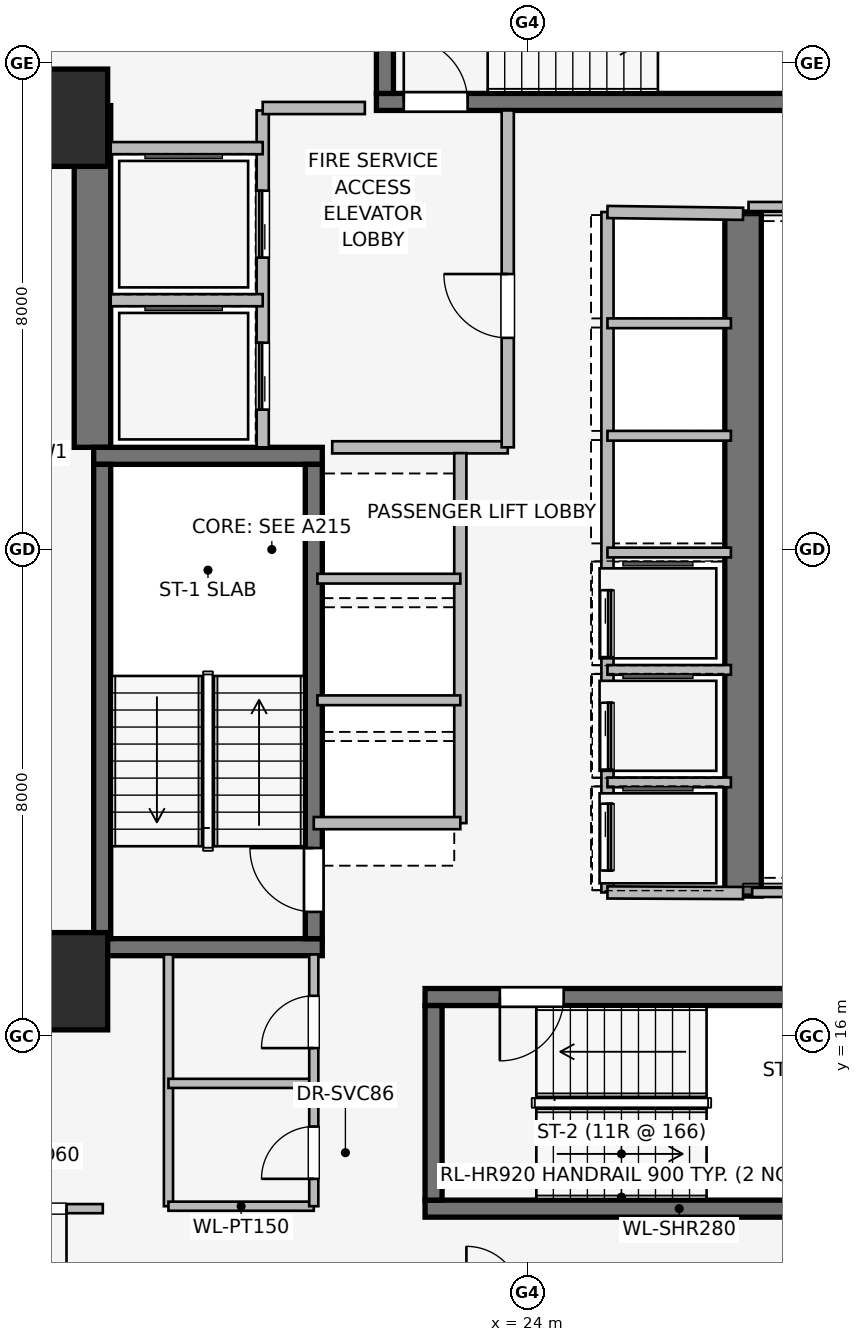
"""IFC4 building model, lengths in metres.
Left out: names, types, materials, properties, quantities, classifications, styles, units other than length and angle.
Written with IfcOpenShell. Run it as: python <this file> out.ifc"""

import sys

from ifc_helpers import new_model, si_unit, direction, frame, frame_2d, origin, origin_2d, place, context, subcontext, project, spatial, rectangle, extrude, element, fill, save


model = new_model("IFC4")
c1 = context("Model", 3, precision=1e-05, world=origin(), true_north=direction((0.0, 1.0)))
c2 = subcontext(c1, "Body", "Model", "MODEL_VIEW")
j1 = project(units=[si_unit("LENGTHUNIT", "METRE"), si_unit("PLANEANGLEUNIT", "RADIAN")], contexts=[c1])
p1 = place(None, origin())
s1 = spatial("IfcSite", under=j1, at=p1, CompositionType="ELEMENT")
p2 = place(p1, origin())
s2 = spatial("IfcBuilding", under=s1, at=p2, CompositionType="ELEMENT")
p3 = place(p2, frame((0.0, 0.0, 52.55)))
s3 = spatial("IfcBuildingStorey", under=s2, at=p3, CompositionType="ELEMENT", Elevation=52.55)
p4 = place(p3, frame((16.85, 25.68, 0.0), z_axis=(0.0, 0.0, 1.0), x_axis=(0.0, 1.0, 0.0)))
e1 = element("IfcWall", 1, at=p4, inside=s3, PredefinedType="SHEAR", context=c2, shape_type="SweptSolid", body=[
    extrude(rectangle(XDim=5.62, YDim=0.6, at=frame_2d((2.81, 0.0))), origin(), (0.0, 0.0, 1.0), 3.65),
])
p5 = place(p3, frame((27.55, 29.55, 0.0), z_axis=(0.0, 0.0, 1.0), x_axis=(0.0, -1.0, 0.0)))
e2 = element("IfcWall", 2, at=p5, inside=s3, PredefinedType="SHEAR", context=c2, shape_type="SweptSolid", body=[
    extrude(rectangle(XDim=11.25, YDim=0.6, at=frame_2d((5.625, 0.0))), origin(), (0.0, 0.0, 1.0), 3.65),
])
for number, where, z_axis, x_axis in (
    (3, (16.87, 17.46, 0.0), (0.0, 0.0, 1.0), (1.0, 0.0, 0.0)),
    (4, (20.63, 25.54, 0.0), (0.0, 0.0, 1.0), (-1.0, 0.0, 0.0)),
):
    element("IfcWall", number, at=place(p3, frame(where, z_axis=z_axis, x_axis=x_axis)), inside=s3, PredefinedType="SHEAR", context=c2, shape_type="SweptSolid", body=[
        extrude(rectangle(XDim=3.76, YDim=0.28, at=frame_2d((1.88, 0.0))), origin(), (0.0, 0.0, 1.0), 3.65),
    ])
p6 = place(p3, frame((17.01, 25.4, 0.0), z_axis=(0.0, 0.0, 1.0), x_axis=(0.0, -1.0, 0.0)))
e5 = element("IfcWall", 5, at=p6, inside=s3, PredefinedType="SHEAR", context=c2, shape_type="SweptSolid", body=[
    extrude(rectangle(XDim=7.8, YDim=0.28, at=frame_2d((3.9, 0.0))), origin(), (0.0, 0.0, 1.0), 3.65),
])
p7 = place(p3, frame((20.49, 17.6, 0.0), z_axis=(0.0, 0.0, 1.0), x_axis=(0.0, 1.0, 0.0)))
e6 = element("IfcWall", 6, at=p7, inside=s3, PredefinedType="SHEAR", context=c2, shape_type="SweptSolid", body=[
    extrude(rectangle(XDim=7.8, YDim=0.28, at=frame_2d((3.9, 0.0))), origin(), (0.0, 0.0, 1.0), 3.65),
])
p8 = place(p7, frame((0.44, 0.0, 0.0)))
e7 = element("IfcOpeningElement", 7, at=p8, cuts=e6, PredefinedType="OPENING", context=c2, shape_type="SweptSolid", body=[
    extrude(rectangle(XDim=1.05, YDim=2.0, at=frame_2d((0.525, 1.0))), frame((0.0, 0.15, 0.0), z_axis=(0.0, -1.0, 0.0), x_axis=(1.0, 0.0, 0.0)), (0.0, 0.0, 1.0), 0.3),
])
p9 = place(p3, frame((22.32, 13.16, 0.0), z_axis=(0.0, 0.0, 1.0), x_axis=(1.0, 0.0, 0.0)))
e8 = element("IfcWall", 8, at=p9, inside=s3, PredefinedType="SHEAR", context=c2, shape_type="SweptSolid", body=[
    extrude(rectangle(XDim=8.36, YDim=0.28, at=frame_2d((4.18, 0.0))), origin(), (0.0, 0.0, 1.0), 3.65),
])
p10 = place(p3, frame((30.68, 16.64, 0.0), z_axis=(0.0, 0.0, 1.0), x_axis=(-1.0, 0.0, 0.0)))
e9 = element("IfcWall", 9, at=p10, inside=s3, PredefinedType="SHEAR", context=c2, shape_type="SweptSolid", body=[
    extrude(rectangle(XDim=8.36, YDim=0.28, at=frame_2d((4.18, 0.0))), origin(), (0.0, 0.0, 1.0), 3.65),
])
p11 = place(p10, frame((6.08, 0.0, 0.0)))
e10 = element("IfcOpeningElement", 10, at=p11, cuts=e9, PredefinedType="OPENING", context=c2, shape_type="SweptSolid", body=[
    extrude(rectangle(XDim=1.05, YDim=2.0, at=frame_2d((0.525, 1.0))), frame((0.0, 0.15, 0.0), z_axis=(0.0, -1.0, 0.0), x_axis=(1.0, 0.0, 0.0)), (0.0, 0.0, 1.0), 0.3),
])
p12 = place(p3, frame((22.46, 16.5, 0.0), z_axis=(0.0, 0.0, 1.0), x_axis=(0.0, -1.0, 0.0)))
e11 = element("IfcWall", 11, at=p12, inside=s3, PredefinedType="SHEAR", context=c2, shape_type="SweptSolid", body=[
    extrude(rectangle(XDim=3.2, YDim=0.28, at=frame_2d((1.6, 0.0))), origin(), (0.0, 0.0, 1.0), 3.65),
])
p13 = place(p3, frame((21.52, 31.36, 0.0), z_axis=(0.0, 0.0, 1.0), x_axis=(1.0, 0.0, 0.0)))
e12 = element("IfcWall", 12, at=p13, inside=s3, PredefinedType="SHEAR", context=c2, shape_type="SweptSolid", body=[
    extrude(rectangle(XDim=8.36, YDim=0.28, at=frame_2d((4.18, 0.0))), origin(), (0.0, 0.0, 1.0), 3.65),
])
p14 = place(p13, frame((0.45, 0.0, 0.0)))
e13 = element("IfcOpeningElement", 13, at=p14, cuts=e12, PredefinedType="OPENING", context=c2, shape_type="SweptSolid", body=[
    extrude(rectangle(XDim=1.05, YDim=2.0, at=frame_2d((0.525, 1.0))), frame((0.0, 0.15, 0.0), z_axis=(0.0, -1.0, 0.0), x_axis=(1.0, 0.0, 0.0)), (0.0, 0.0, 1.0), 0.3),
])
p15 = place(p3, frame((21.66, 34.7, 0.0), z_axis=(0.0, 0.0, 1.0), x_axis=(0.0, -1.0, 0.0)))
e14 = element("IfcWall", 14, at=p15, inside=s3, PredefinedType="SHEAR", context=c2, shape_type="SweptSolid", body=[
    extrude(rectangle(XDim=3.2, YDim=0.28, at=frame_2d((1.6, 0.0))), origin(), (0.0, 0.0, 1.0), 3.65),
])
for number, where, z_axis, x_axis in (
    (15, (16.3, 16.9, 0.0), (0.0, 0.0, 1.0), (1.0, 0.0, 0.0)),
    (16, (16.3, 31.1, 0.0), (0.0, 0.0, 1.0), (1.0, 0.0, 0.0)),
):
    element("IfcColumn", number, at=place(p3, frame(where, z_axis=z_axis, x_axis=x_axis)), inside=s3, PredefinedType="COLUMN", context=c2, shape_type="SweptSolid", body=[
        extrude(rectangle(XDim=1.6, YDim=1.6, at=origin_2d()), origin(), (0.0, 0.0, 1.0), 3.65),
    ])
p16 = place(p3, frame((19.65, 25.68, 0.0), z_axis=(0.0, 0.0, 1.0), x_axis=(0.0, 1.0, 0.0)))
e17 = element("IfcWall", 17, at=p16, inside=s3, PredefinedType="PARTITIONING", context=c2, shape_type="SweptSolid", body=[
    extrude(rectangle(XDim=5.54, YDim=0.2, at=frame_2d((2.77, 0.0))), origin(), (0.0, 0.0, 1.0), 3.36),
])
p17 = place(p16, frame((0.62, 0.0, 0.0)))
e18 = element("IfcOpeningElement", 18, at=p17, cuts=e17, PredefinedType="OPENING", context=c2, shape_type="SweptSolid", body=[
    extrude(rectangle(XDim=1.1, YDim=2.2, at=frame_2d((0.55, 1.1))), frame((0.0, 0.11, 0.0), z_axis=(0.0, -1.0, 0.0), x_axis=(1.0, 0.0, 0.0)), (0.0, 0.0, 1.0), 0.22),
])
p18 = place(p16, frame((3.12, 0.0, 0.0)))
e19 = element("IfcOpeningElement", 19, at=p18, cuts=e17, PredefinedType="OPENING", context=c2, shape_type="SweptSolid", body=[
    extrude(rectangle(XDim=1.1, YDim=2.2, at=frame_2d((0.55, 1.1))), frame((0.0, 0.11, 0.0), z_axis=(0.0, -1.0, 0.0), x_axis=(1.0, 0.0, 0.0)), (0.0, 0.0, 1.0), 0.22),
])
p19 = place(p3, frame((20.793, 25.68, 0.0), z_axis=(0.0, 0.0, 1.0), x_axis=(1.0, 0.0, 0.0)))
e20 = element("IfcWall", 20, at=p19, inside=s3, PredefinedType="PARTITIONING", context=c2, shape_type="SweptSolid", body=[
    extrude(rectangle(XDim=2.887, YDim=0.2, at=frame_2d((1.443, 0.0))), origin(), (0.0, 0.0, 1.0), 3.36),
])
p20 = place(p3, frame((23.68, 25.68, 0.0), z_axis=(0.0, 0.0, 1.0), x_axis=(0.0, 1.0, 0.0)))
e21 = element("IfcWall", 21, at=p20, inside=s3, PredefinedType="PARTITIONING", context=c2, shape_type="SweptSolid", body=[
    extrude(rectangle(XDim=5.54, YDim=0.2, at=frame_2d((2.77, 0.0))), origin(), (0.0, 0.0, 1.0), 3.36),
])
p21 = place(p20, frame((1.8, 0.0, 0.0)))
e22 = element("IfcOpeningElement", 22, at=p21, cuts=e21, PredefinedType="OPENING", context=c2, shape_type="SweptSolid", body=[
    extrude(rectangle(XDim=1.05, YDim=2.0, at=frame_2d((0.525, 1.0))), frame((0.0, 0.11, 0.0), z_axis=(0.0, -1.0, 0.0), x_axis=(1.0, 0.0, 0.0)), (0.0, 0.0, 1.0), 0.22),
])
p22 = place(p3, frame((21.33, 31.26, 0.0), z_axis=(0.0, 0.0, 1.0), x_axis=(-1.0, 0.0, 0.0)))
e23 = element("IfcWall", 23, at=p22, inside=s3, PredefinedType="PARTITIONING", context=c2, shape_type="SweptSolid", body=[
    extrude(rectangle(XDim=1.68, YDim=0.2, at=frame_2d((0.84, 0.0))), origin(), (0.0, 0.0, 1.0), 3.36),
])
p23 = place(p3, frame((17.15, 28.1, 0.0), z_axis=(0.0, 0.0, 1.0), x_axis=(1.0, 0.0, 0.0)))
e24 = element("IfcWall", 24, at=p23, inside=s3, PredefinedType="PARTITIONING", context=c2, shape_type="SweptSolid", body=[
    extrude(rectangle(XDim=2.5, YDim=0.2, at=frame_2d((1.25, 0.0))), origin(), (0.0, 0.0, 1.0), 3.36),
])
p24 = place(p3, frame((19.65, 30.6, 0.0), z_axis=(0.0, 0.0, 1.0), x_axis=(-1.0, 0.0, 0.0)))
e25 = element("IfcWall", 25, at=p24, inside=s3, PredefinedType="PARTITIONING", context=c2, shape_type="SweptSolid", body=[
    extrude(rectangle(XDim=2.5, YDim=0.2, at=frame_2d((1.25, 0.0))), origin(), (0.0, 0.0, 1.0), 2.26),
])
p25 = place(p3, frame((22.9, 19.5, 0.0), z_axis=(0.0, 0.0, 1.0), x_axis=(0.0, 1.0, 0.0)))
e26 = element("IfcWall", 26, at=p25, inside=s3, PredefinedType="PARTITIONING", context=c2, shape_type="SweptSolid", body=[
    extrude(rectangle(XDim=6.085, YDim=0.2, at=frame_2d((3.042, 0.0))), origin(), (0.0, 0.0, 1.0), 3.36),
])
p26 = place(p3, frame((20.49, 19.5, 0.0), z_axis=(0.0, 0.0, 1.0), x_axis=(1.0, 0.0, 0.0)))
e27 = element("IfcWall", 27, at=p26, inside=s3, PredefinedType="PARTITIONING", context=c2, shape_type="SweptSolid", body=[
    extrude(rectangle(XDim=2.41, YDim=0.2, at=frame_2d((1.205, 0.0))), origin(), (0.0, 0.0, 1.0), 2.26),
])
for number, where, z_axis, x_axis in (
    (28, (20.55, 21.52, 0.0), (0.0, 0.0, 1.0), (1.0, 0.0, 0.0)),
    (29, (20.55, 23.52, 0.0), (0.0, 0.0, 1.0), (1.0, 0.0, 0.0)),
):
    element("IfcWall", number, at=place(p3, frame(where, z_axis=z_axis, x_axis=x_axis)), inside=s3, PredefinedType="PARTITIONING", context=c2, shape_type="SweptSolid", body=[
        extrude(rectangle(XDim=2.35, YDim=0.16, at=frame_2d((1.175, 0.0))), origin(), (0.0, 0.0, 1.0), 3.36),
    ])
p27 = place(p3, frame((25.32, 29.55, 0.0), z_axis=(0.0, 0.0, 1.0), x_axis=(0.0, -1.0, 0.0)))
e30 = element("IfcWall", 30, at=p27, inside=s3, PredefinedType="PARTITIONING", context=c2, shape_type="SweptSolid", body=[
    extrude(rectangle(XDim=11.19, YDim=0.2, at=frame_2d((5.595, 0.0))), origin(), (0.0, 0.0, 1.0), 3.36),
])
p28 = place(p27, frame((6.22, 0.0, 0.0)))
e31 = element("IfcOpeningElement", 31, at=p28, cuts=e30, PredefinedType="OPENING", context=c2, shape_type="SweptSolid", body=[
    extrude(rectangle(XDim=1.1, YDim=2.2, at=frame_2d((0.55, 1.1))), frame((0.0, 0.11, 0.0), z_axis=(0.0, -1.0, 0.0), x_axis=(1.0, 0.0, 0.0)), (0.0, 0.0, 1.0), 0.22),
])
p29 = place(p27, frame((8.07, 0.0, 0.0)))
e32 = element("IfcOpeningElement", 32, at=p29, cuts=e30, PredefinedType="OPENING", context=c2, shape_type="SweptSolid", body=[
    extrude(rectangle(XDim=1.1, YDim=2.2, at=frame_2d((0.55, 1.1))), frame((0.0, 0.11, 0.0), z_axis=(0.0, -1.0, 0.0), x_axis=(1.0, 0.0, 0.0)), (0.0, 0.0, 1.0), 0.22),
])
p30 = place(p27, frame((9.73, 0.0, 0.0)))
e33 = element("IfcOpeningElement", 33, at=p30, cuts=e30, PredefinedType="OPENING", context=c2, shape_type="SweptSolid", body=[
    extrude(rectangle(XDim=1.1, YDim=2.2, at=frame_2d((0.55, 1.1))), frame((0.0, 0.11, 0.0), z_axis=(0.0, -1.0, 0.0), x_axis=(1.0, 0.0, 0.0)), (0.0, 0.0, 1.0), 0.22),
])
p31 = place(p3, frame((25.32, 18.36, 0.0), z_axis=(0.0, 0.0, 1.0), x_axis=(0.999989925833, -0.004488678231, 0.0)))
e34 = element("IfcWall", 34, at=p31, inside=s3, PredefinedType="PARTITIONING", context=c2, shape_type="SweptSolid", body=[
    extrude(rectangle(XDim=2.23, YDim=0.2, at=frame_2d((1.115, 0.0))), origin(), (0.0, 0.0, 1.0), 3.36),
])
p32 = place(p3, frame((27.55, 29.52, 0.0), z_axis=(0.0, 0.0, 1.0), x_axis=(-0.999909343457, 0.013464949556, 0.0)))
e35 = element("IfcWall", 35, at=p32, inside=s3, PredefinedType="PARTITIONING", context=c2, shape_type="SweptSolid", body=[
    extrude(rectangle(XDim=2.23, YDim=0.2, at=frame_2d((1.115, 0.0))), origin(), (0.0, 0.0, 1.0), 2.26),
])
for number, where, z_axis, x_axis in (
    (36, (25.32, 20.17, 0.0), (0.0, 0.0, 1.0), (1.0, 0.0, 0.0)),
    (37, (25.32, 22.02, 0.0), (0.0, 0.0, 1.0), (1.0, 0.0, 0.0)),
    (38, (25.32, 23.95, 0.0), (0.0, 0.0, 1.0), (1.0, 0.0, 0.0)),
    (39, (25.32, 25.87, 0.0), (0.0, 0.0, 1.0), (1.0, 0.0, 0.0)),
    (40, (25.32, 27.72, 0.0), (0.0, 0.0, 1.0), (1.0, 0.0, 0.0)),
):
    element("IfcWall", number, at=place(p3, frame(where, z_axis=z_axis, x_axis=x_axis)), inside=s3, PredefinedType="PARTITIONING", context=c2, shape_type="SweptSolid", body=[
        extrude(rectangle(XDim=2.03, YDim=0.16, at=frame_2d((1.015, 0.0))), origin(), (0.0, 0.0, 1.0), 3.36),
    ])
p33 = place(p3, frame((18.1, 17.34, 0.0), z_axis=(0.0, 0.0, 1.0), x_axis=(0.0, -1.0, 0.0)))
e41 = element("IfcWall", 41, at=p33, inside=s3, PredefinedType="PARTITIONING", context=c2, shape_type="SweptSolid", body=[
    extrude(rectangle(XDim=4.14, YDim=0.15, at=frame_2d((2.07, 0.0))), origin(), (0.0, 0.0, 1.0), 3.36),
])
for number, where, z_axis, x_axis in (
    (42, (18.1, 13.2, 0.0), (0.0, 0.0, 1.0), (1.0, 0.0, 0.0)),
    (43, (18.1, 15.22, 0.0), (0.0, 0.0, 1.0), (1.0, 0.0, 0.0)),
):
    element("IfcWall", number, at=place(p3, frame(where, z_axis=z_axis, x_axis=x_axis)), inside=s3, PredefinedType="PARTITIONING", context=c2, shape_type="SweptSolid", body=[
        extrude(rectangle(XDim=2.39, YDim=0.15, at=frame_2d((1.195, 0.0))), origin(), (0.0, 0.0, 1.0), 3.36),
    ])
p34 = place(p3, frame((20.49, 13.2, 0.0), z_axis=(0.0, 0.0, 1.0), x_axis=(0.0, 1.0, 0.0)))
e44 = element("IfcWall", 44, at=p34, inside=s3, PredefinedType="PARTITIONING", context=c2, shape_type="SweptSolid", body=[
    extrude(rectangle(XDim=4.14, YDim=0.15, at=frame_2d((2.07, 0.0))), origin(), (0.0, 0.0, 1.0), 3.36),
])
p35 = place(p34, frame((0.45, 0.0, 0.0)))
e45 = element("IfcOpeningElement", 45, at=p35, cuts=e44, PredefinedType="OPENING", context=c2, shape_type="SweptSolid", body=[
    extrude(rectangle(XDim=0.86, YDim=2.0, at=frame_2d((0.43, 1.0))), frame((0.0, 0.085, 0.0), z_axis=(0.0, -1.0, 0.0), x_axis=(1.0, 0.0, 0.0)), (0.0, 0.0, 1.0), 0.17),
])
p36 = place(p34, frame((2.6, 0.0, 0.0)))
e46 = element("IfcOpeningElement", 46, at=p36, cuts=e44, PredefinedType="OPENING", context=c2, shape_type="SweptSolid", body=[
    extrude(rectangle(XDim=0.86, YDim=2.0, at=frame_2d((0.43, 1.0))), frame((0.0, 0.085, 0.0), z_axis=(0.0, -1.0, 0.0), x_axis=(1.0, 0.0, 0.0)), (0.0, 0.0, 1.0), 0.17),
])
p37 = place(p3, frame((27.7, 18.36, 0.0), z_axis=(0.0, 0.0, 1.0), x_axis=(1.0, 0.0, 0.0)))
e47 = element("IfcWall", 47, at=p37, inside=s3, PredefinedType="PARTITIONING", context=c2, shape_type="SweptSolid", body=[
    extrude(rectangle(XDim=12.14, YDim=0.15, at=frame_2d((6.07, 0.0))), origin(), (0.0, 0.0, 1.0), 2.501),
])
p38 = place(p3, frame((39.84, 29.64, 0.0), z_axis=(0.0, 0.0, 1.0), x_axis=(-1.0, 0.0, 0.0)))
e48 = element("IfcWall", 48, at=p38, inside=s3, PredefinedType="PARTITIONING", context=c2, shape_type="SweptSolid", body=[
    extrude(rectangle(XDim=12.2, YDim=0.15, at=frame_2d((6.1, 0.0))), origin(), (0.0, 0.0, 1.0), 2.501),
])
p39 = place(p3, frame((17.02, 13.16, 0.0), z_axis=(0.0, 0.0, 1.0), x_axis=(-1.0, 0.0, 0.0)))
e49 = element("IfcWall", 49, at=p39, inside=s3, PredefinedType="PARTITIONING", context=c2, shape_type="SweptSolid", body=[
    extrude(rectangle(XDim=2.12, YDim=0.15, at=frame_2d((1.06, 0.0))), origin(), (0.0, 0.0, 1.0), 3.36),
])
p40 = place(p39, frame((0.597, 0.0, 0.0)))
e50 = element("IfcOpeningElement", 50, at=p40, cuts=e49, PredefinedType="OPENING", context=c2, shape_type="SweptSolid", body=[
    extrude(rectangle(XDim=0.96, YDim=2.0, at=frame_2d((0.48, 1.0))), frame((0.0, 0.085, 0.0), z_axis=(0.0, -1.0, 0.0), x_axis=(1.0, 0.0, 0.0)), (0.0, 0.0, 1.0), 0.17),
])
p41 = place(p8, origin())
e51 = element("IfcDoor", 51, at=p41, inside=s3, OperationType="SINGLE_SWING_RIGHT", PredefinedType="DOOR", context=c2, shape_type="SweptSolid", body=[
    extrude(rectangle(XDim=1.05, YDim=2.0, at=frame_2d((0.525, 1.0))), frame((0.0, 0.025, 0.0), z_axis=(0.0, -1.0, 0.0), x_axis=(1.0, 0.0, 0.0)), (0.0, 0.0, 1.0), 0.05),
])
fill(e7, e51)
p42 = place(p11, origin())
e52 = element("IfcDoor", 52, at=p42, inside=s3, OperationType="SINGLE_SWING_RIGHT", PredefinedType="DOOR", context=c2, shape_type="SweptSolid", body=[
    extrude(rectangle(XDim=1.05, YDim=2.0, at=frame_2d((0.525, 1.0))), frame((0.0, 0.025, 0.0), z_axis=(0.0, -1.0, 0.0), x_axis=(1.0, 0.0, 0.0)), (0.0, 0.0, 1.0), 0.05),
])
fill(e10, e52)
p43 = place(p14, origin())
e53 = element("IfcDoor", 53, at=p43, inside=s3, OperationType="SINGLE_SWING_LEFT", PredefinedType="DOOR", context=c2, shape_type="SweptSolid", body=[
    extrude(rectangle(XDim=1.05, YDim=2.0, at=frame_2d((0.525, 1.0))), frame((0.0, 0.025, 0.0), z_axis=(0.0, -1.0, 0.0), x_axis=(1.0, 0.0, 0.0)), (0.0, 0.0, 1.0), 0.05),
])
fill(e13, e53)
p44 = place(p17, origin())
e54 = element("IfcDoor", 54, at=p44, inside=s3, OperationType="SLIDING_TO_LEFT", PredefinedType="DOOR", context=c2, shape_type="SweptSolid", body=[
    extrude(rectangle(XDim=1.1, YDim=2.2, at=frame_2d((0.55, 1.1))), frame((0.0, 0.025, 0.0), z_axis=(0.0, -1.0, 0.0), x_axis=(1.0, 0.0, 0.0)), (0.0, 0.0, 1.0), 0.05),
])
fill(e18, e54)
p45 = place(p18, origin())
e55 = element("IfcDoor", 55, at=p45, inside=s3, OperationType="SLIDING_TO_LEFT", PredefinedType="DOOR", context=c2, shape_type="SweptSolid", body=[
    extrude(rectangle(XDim=1.1, YDim=2.2, at=frame_2d((0.55, 1.1))), frame((0.0, 0.025, 0.0), z_axis=(0.0, -1.0, 0.0), x_axis=(1.0, 0.0, 0.0)), (0.0, 0.0, 1.0), 0.05),
])
fill(e19, e55)
p46 = place(p21, origin())
e56 = element("IfcDoor", 56, at=p46, inside=s3, OperationType="SINGLE_SWING_RIGHT", PredefinedType="DOOR", context=c2, shape_type="SweptSolid", body=[
    extrude(rectangle(XDim=1.05, YDim=2.0, at=frame_2d((0.525, 1.0))), frame((0.0, 0.025, 0.0), z_axis=(0.0, -1.0, 0.0), x_axis=(1.0, 0.0, 0.0)), (0.0, 0.0, 1.0), 0.05),
])
fill(e22, e56)
p47 = place(p28, origin())
e57 = element("IfcDoor", 57, at=p47, inside=s3, OperationType="SLIDING_TO_LEFT", PredefinedType="DOOR", context=c2, shape_type="SweptSolid", body=[
    extrude(rectangle(XDim=1.1, YDim=2.2, at=frame_2d((0.55, 1.1))), frame((0.0, 0.025, 0.0), z_axis=(0.0, -1.0, 0.0), x_axis=(1.0, 0.0, 0.0)), (0.0, 0.0, 1.0), 0.05),
])
fill(e31, e57)
p48 = place(p29, origin())
e58 = element("IfcDoor", 58, at=p48, inside=s3, OperationType="SLIDING_TO_LEFT", PredefinedType="DOOR", context=c2, shape_type="SweptSolid", body=[
    extrude(rectangle(XDim=1.1, YDim=2.2, at=frame_2d((0.55, 1.1))), frame((0.0, 0.025, 0.0), z_axis=(0.0, -1.0, 0.0), x_axis=(1.0, 0.0, 0.0)), (0.0, 0.0, 1.0), 0.05),
])
fill(e32, e58)
p49 = place(p30, origin())
e59 = element("IfcDoor", 59, at=p49, inside=s3, OperationType="SLIDING_TO_LEFT", PredefinedType="DOOR", context=c2, shape_type="SweptSolid", body=[
    extrude(rectangle(XDim=1.1, YDim=2.2, at=frame_2d((0.55, 1.1))), frame((0.0, 0.025, 0.0), z_axis=(0.0, -1.0, 0.0), x_axis=(1.0, 0.0, 0.0)), (0.0, 0.0, 1.0), 0.05),
])
fill(e33, e59)
p50 = place(p35, origin())
e60 = element("IfcDoor", 60, at=p50, inside=s3, OperationType="SINGLE_SWING_LEFT", PredefinedType="DOOR", context=c2, shape_type="SweptSolid", body=[
    extrude(rectangle(XDim=0.86, YDim=2.0, at=frame_2d((0.43, 1.0))), frame((0.0, 0.025, 0.0), z_axis=(0.0, -1.0, 0.0), x_axis=(1.0, 0.0, 0.0)), (0.0, 0.0, 1.0), 0.05),
])
fill(e45, e60)
p51 = place(p36, origin())
e61 = element("IfcDoor", 61, at=p51, inside=s3, OperationType="SINGLE_SWING_LEFT", PredefinedType="DOOR", context=c2, shape_type="SweptSolid", body=[
    extrude(rectangle(XDim=0.86, YDim=2.0, at=frame_2d((0.43, 1.0))), frame((0.0, 0.025, 0.0), z_axis=(0.0, -1.0, 0.0), x_axis=(1.0, 0.0, 0.0)), (0.0, 0.0, 1.0), 0.05),
])
fill(e46, e61)
p52 = place(p40, origin())
e62 = element("IfcDoor", 62, at=p52, inside=s3, OperationType="SINGLE_SWING_LEFT", PredefinedType="DOOR", context=c2, shape_type="SweptSolid", body=[
    extrude(rectangle(XDim=0.96, YDim=2.0, at=frame_2d((0.48, 1.0))), frame((0.0, 0.025, 0.0), z_axis=(0.0, -1.0, 0.0), x_axis=(1.0, 0.0, 0.0)), (0.0, 0.0, 1.0), 0.05),
])
fill(e50, e62)
save(model, sys.argv[1])
